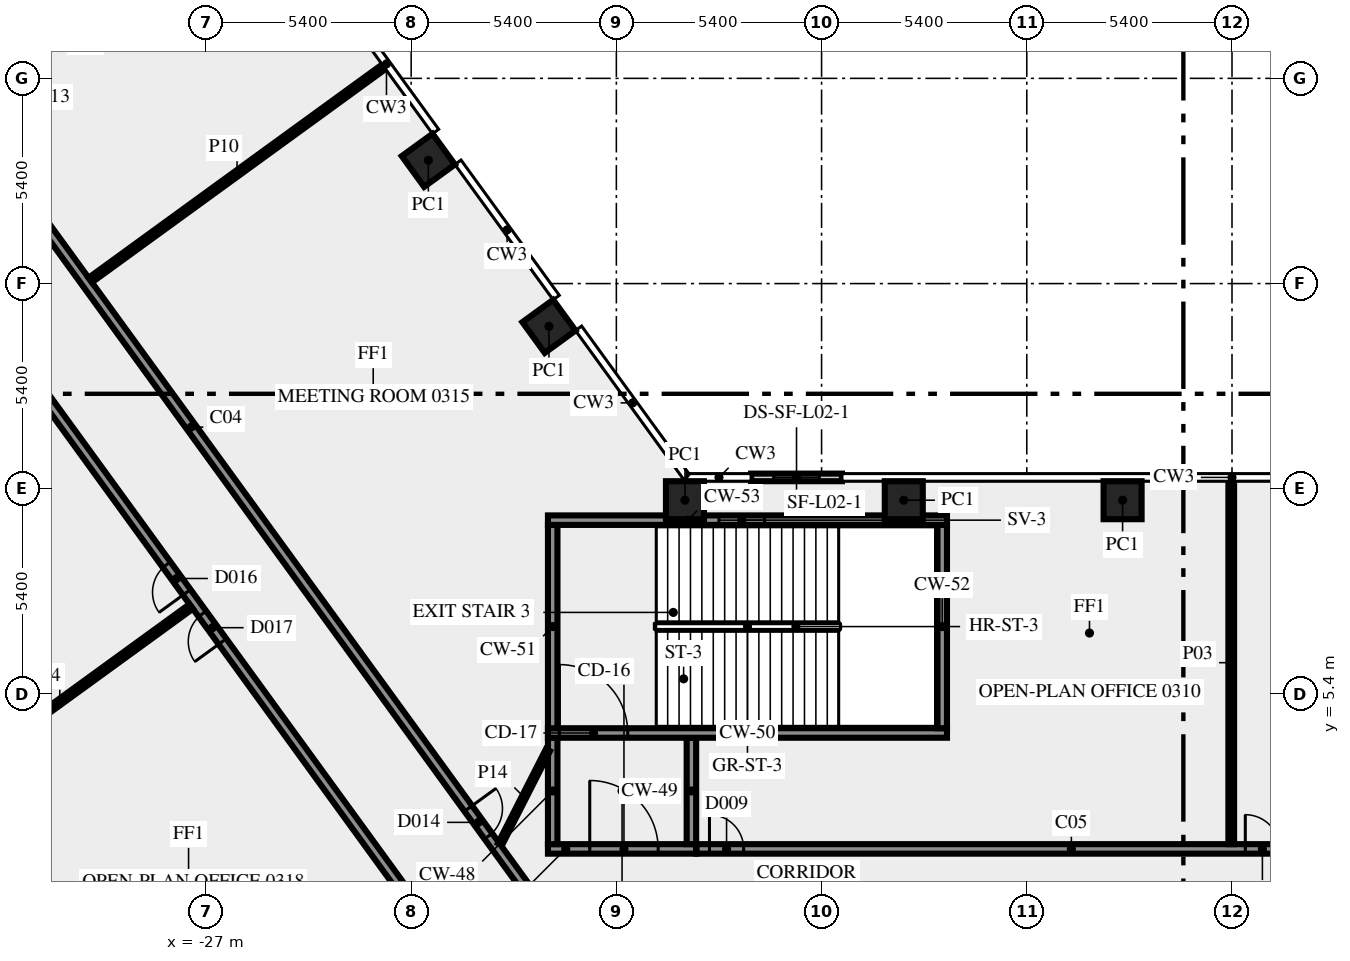
"""IFC4 building model, lengths in metres.
Left out: names, types, materials, properties, quantities, classifications, styles, units other than length and angle.
Written with IfcOpenShell. Run it as: python <this file> out.ifc"""

import sys

from ifc_helpers import new_model, si_unit, direction, frame, frame_2d, origin, origin_2d, place, context, subcontext, project, spatial, rectangle, extrude, element, fill, save


model = new_model("IFC4")
c1 = context("Model", 3, precision=1e-05, world=origin(), true_north=direction((0.0, 1.0)))
c2 = subcontext(c1, "Body", "Model", "MODEL_VIEW")
j1 = project(units=[si_unit("LENGTHUNIT", "METRE"), si_unit("PLANEANGLEUNIT", "RADIAN")], contexts=[c1])
p1 = place(None, origin())
s1 = spatial("IfcSite", under=j1, at=p1, CompositionType="ELEMENT")
p2 = place(p1, origin())
s2 = spatial("IfcBuilding", under=s1, at=p2, CompositionType="ELEMENT")
p3 = place(p2, frame((0.0, 0.0, 16.0)))
s3 = spatial("IfcBuildingStorey", under=s2, at=p3, CompositionType="ELEMENT", Elevation=16.0)
for number, where, z_axis, x_axis in (
    (1, (-17.974, 15.075, 0.0), (0.0, 0.0, 1.0), (-0.588, 0.809, 0.0)),
    (2, (-21.147, 19.444, 0.0), (0.0, 0.0, 1.0), (-0.588, 0.809, 0.0)),
    (3, (-2.879, 10.5, 0.0), (0.0, 0.0, 1.0), (-1.0, 0.0, 0.0)),
    (4, (-8.637, 10.5, 0.0), (0.0, 0.0, 1.0), (-1.0, 0.0, 0.0)),
    (5, (-14.395, 10.5, 0.0), (0.0, 0.0, 1.0), (-1.0, 0.0, 0.0)),
):
    element("IfcColumn", number, at=place(p3, frame(where, z_axis=z_axis, x_axis=x_axis)), inside=s3, PredefinedType="COLUMN", context=c2, shape_type="SweptSolid", body=[
        extrude(rectangle(XDim=1.0, YDim=1.0, at=origin_2d()), origin(), (0.0, 0.0, 1.0), 4.1),
    ])
p4 = place(p3, frame((-10.263, 11.1, 0.0), z_axis=(0.0, 0.0, 1.0), x_axis=(-1.0, 0.0, 0.0)))
e6 = element("IfcWall", 6, at=p4, inside=s3, PredefinedType="SOLIDWALL", context=c2, shape_type="SweptSolid", body=[
    extrude(rectangle(XDim=2.392, YDim=0.2, at=frame_2d((1.196, 0.0))), origin(), (0.0, 0.0, 1.0), 4.1),
])
p5 = place(p4, frame((0.596, 0.0, 1.0)))
e7 = element("IfcOpeningElement", 7, at=p5, cuts=e6, PredefinedType="OPENING", context=c2, shape_type="SweptSolid", body=[
    extrude(rectangle(XDim=1.2, YDim=1.2, at=frame_2d((0.6, 0.6))), frame((0.0, 0.11, 0.0), z_axis=(0.0, -1.0, 0.0), x_axis=(1.0, 0.0, 0.0)), (0.0, 0.0, 1.0), 0.22),
])
p6 = place(p3, frame((-18.0, 1.325, 0.0), z_axis=(0.0, 0.0, 1.0), x_axis=(1.0, 0.0, 0.0)))
e8 = element("IfcWall", 8, at=p6, inside=s3, PredefinedType="SHEAR", context=c2, shape_type="SweptSolid", body=[
    extrude(rectangle(XDim=3.9, YDim=0.25, at=frame_2d((1.95, 0.0))), origin(), (0.0, 0.0, 1.0), 4.1),
])
p7 = place(p6, frame((1.1, 0.0, 0.0)))
e9 = element("IfcOpeningElement", 9, at=p7, cuts=e8, PredefinedType="OPENING", context=c2, shape_type="SweptSolid", body=[
    extrude(rectangle(XDim=1.8, YDim=2.1, at=frame_2d((0.9, 1.05))), frame((0.0, 0.135, 0.0), z_axis=(0.0, -1.0, 0.0), x_axis=(1.0, 0.0, 0.0)), (0.0, 0.0, 1.0), 0.27),
])
for number, where, z_axis, x_axis in (
    (10, (-17.875, 1.45, 0.0), (0.0, 0.0, 1.0), (0.0, 1.0, 0.0)),
    (11, (-14.225, 1.45, 0.0), (0.0, 0.0, 1.0), (0.0, 1.0, 0.0)),
):
    element("IfcWall", number, at=place(p3, frame(where, z_axis=z_axis, x_axis=x_axis)), inside=s3, PredefinedType="SHEAR", context=c2, shape_type="SweptSolid", body=[
        extrude(rectangle(XDim=2.8, YDim=0.25, at=frame_2d((1.4, 0.0))), origin(), (0.0, 0.0, 1.0), 4.1),
    ])
p8 = place(p3, frame((-18.0, 4.375, 0.0), z_axis=(0.0, 0.0, 1.0), x_axis=(1.0, 0.0, 0.0)))
e12 = element("IfcWall", 12, at=p8, inside=s3, PredefinedType="SHEAR", context=c2, shape_type="SweptSolid", body=[
    extrude(rectangle(XDim=10.5, YDim=0.25, at=frame_2d((5.25, 0.0))), origin(), (0.0, 0.0, 1.0), 4.1),
])
p9 = place(p8, frame((0.3, 0.0, 0.0)))
e13 = element("IfcOpeningElement", 13, at=p9, cuts=e12, PredefinedType="OPENING", context=c2, shape_type="SweptSolid", body=[
    extrude(rectangle(XDim=1.8, YDim=2.1, at=frame_2d((0.9, 1.05))), frame((0.0, 0.135, 0.0), z_axis=(0.0, -1.0, 0.0), x_axis=(1.0, 0.0, 0.0)), (0.0, 0.0, 1.0), 0.27),
])
for number, where, z_axis, x_axis in (
    (14, (-17.875, 4.5, 0.0), (0.0, 0.0, 1.0), (0.0, 1.0, 0.0)),
    (15, (-7.625, 4.5, 0.0), (0.0, 0.0, 1.0), (0.0, 1.0, 0.0)),
):
    element("IfcWall", number, at=place(p3, frame(where, z_axis=z_axis, x_axis=x_axis)), inside=s3, PredefinedType="SHEAR", context=c2, shape_type="SweptSolid", body=[
        extrude(rectangle(XDim=5.35, YDim=0.25, at=frame_2d((2.675, 0.0))), origin(), (0.0, 0.0, 1.0), 4.1),
    ])
p10 = place(p3, frame((-18.0, 9.975, 0.0), z_axis=(0.0, 0.0, 1.0), x_axis=(1.0, 0.0, 0.0)))
e16 = element("IfcWall", 16, at=p10, inside=s3, PredefinedType="SHEAR", context=c2, shape_type="SweptSolid", body=[
    extrude(rectangle(XDim=10.5, YDim=0.25, at=frame_2d((5.25, 0.0))), origin(), (0.0, 0.0, 1.0), 4.1),
])
p11 = place(p10, frame((4.5, 0.0, 1.0)))
e17 = element("IfcOpeningElement", 17, at=p11, cuts=e16, PredefinedType="OPENING", context=c2, shape_type="SweptSolid", body=[
    extrude(rectangle(XDim=1.2, YDim=1.2, at=frame_2d((0.6, 0.6))), frame((0.0, 0.135, 0.0), z_axis=(0.0, -1.0, 0.0), x_axis=(1.0, 0.0, 0.0)), (0.0, 0.0, 1.0), 0.27),
])
p12 = place(p3, frame((-20.531, -1.523, 0.0), z_axis=(0.0, 0.0, 1.0), x_axis=(-0.587784522481, 0.809017524614, 0.0)))
e18 = element("IfcWall", 18, at=p12, inside=s3, PredefinedType="SOLIDWALL", context=c2, shape_type="SweptSolid", body=[
    extrude(rectangle(XDim=49.912, YDim=0.25, at=frame_2d((24.956, 0.0))), origin(), (0.0, 0.0, 1.0), 4.1),
])
p13 = place(p12, frame((10.266, 0.0, 0.0)))
e19 = element("IfcOpeningElement", 19, at=p13, cuts=e18, PredefinedType="OPENING", context=c2, shape_type="SweptSolid", body=[
    extrude(rectangle(XDim=0.9, YDim=2.1, at=frame_2d((0.45, 1.05))), frame((0.0, 0.135, 0.0), z_axis=(0.0, -1.0, 0.0), x_axis=(1.0, 0.0, 0.0)), (0.0, 0.0, 1.0), 0.27),
])
p14 = place(p12, frame((37.193, 0.0, 0.0)))
e20 = element("IfcOpeningElement", 20, at=p14, cuts=e18, PredefinedType="OPENING", context=c2, shape_type="SweptSolid", body=[
    extrude(rectangle(XDim=1.8, YDim=2.1, at=frame_2d((0.9, 1.05))), frame((0.0, 0.135, 0.0), z_axis=(0.0, -1.0, 0.0), x_axis=(1.0, 0.0, 0.0)), (0.0, 0.0, 1.0), 0.27),
])
p15 = place(p12, frame((11.866, 0.0, 0.0)))
e21 = element("IfcOpeningElement", 21, at=p15, cuts=e18, PredefinedType="OPENING", context=c2, shape_type="SweptSolid", body=[
    extrude(rectangle(XDim=0.9, YDim=2.1, at=frame_2d((0.45, 1.05))), frame((0.0, 0.135, 0.0), z_axis=(0.0, -1.0, 0.0), x_axis=(1.0, 0.0, 0.0)), (0.0, 0.0, 1.0), 0.27),
])
p16 = place(p3, frame((-37.232, 25.972, 0.0), z_axis=(0.0, 0.0, 1.0), x_axis=(0.587786323093, -0.809016216391, 0.0)))
e22 = element("IfcWall", 22, at=p16, inside=s3, PredefinedType="SOLIDWALL", context=c2, shape_type="SweptSolid", body=[
    extrude(rectangle(XDim=33.493, YDim=0.25, at=frame_2d((16.747, 0.0))), origin(), (0.0, 0.0, 1.0), 4.1),
])
p17 = place(p16, frame((29.152, 0.0, 0.0)))
e23 = element("IfcOpeningElement", 23, at=p17, cuts=e22, PredefinedType="OPENING", context=c2, shape_type="SweptSolid", body=[
    extrude(rectangle(XDim=0.9, YDim=2.1, at=frame_2d((0.45, 1.05))), frame((0.0, 0.135, 0.0), z_axis=(0.0, -1.0, 0.0), x_axis=(1.0, 0.0, 0.0)), (0.0, 0.0, 1.0), 0.27),
])
p18 = place(p16, frame((5.113, 0.0, 0.0)))
e24 = element("IfcOpeningElement", 24, at=p18, cuts=e22, PredefinedType="OPENING", context=c2, shape_type="SweptSolid", body=[
    extrude(rectangle(XDim=1.8, YDim=2.1, at=frame_2d((0.9, 1.05))), frame((0.0, 0.135, 0.0), z_axis=(0.0, -1.0, 0.0), x_axis=(1.0, 0.0, 0.0)), (0.0, 0.0, 1.0), 0.27),
])
p19 = place(p3, frame((-14.09, 1.325, 0.0), z_axis=(0.0, 0.0, 1.0), x_axis=(1.0, 0.0, 0.0)))
e25 = element("IfcWall", 25, at=p19, inside=s3, PredefinedType="SOLIDWALL", context=c2, shape_type="SweptSolid", body=[
    extrude(rectangle(XDim=28.18, YDim=0.25, at=frame_2d((14.09, 0.0))), origin(), (0.0, 0.0, 1.0), 4.1),
])
p20 = place(p19, frame((0.34, 0.0, 0.0)))
e26 = element("IfcOpeningElement", 26, at=p20, cuts=e25, PredefinedType="OPENING", context=c2, shape_type="SweptSolid", body=[
    extrude(rectangle(XDim=0.9, YDim=2.1, at=frame_2d((0.45, 1.05))), frame((0.0, 0.135, 0.0), z_axis=(0.0, -1.0, 0.0), x_axis=(1.0, 0.0, 0.0)), (0.0, 0.0, 1.0), 0.27),
])
p21 = place(p19, frame((14.44, 0.0, 0.0)))
e27 = element("IfcOpeningElement", 27, at=p21, cuts=e25, PredefinedType="OPENING", context=c2, shape_type="SweptSolid", body=[
    extrude(rectangle(XDim=0.9, YDim=2.1, at=frame_2d((0.45, 1.05))), frame((0.0, 0.135, 0.0), z_axis=(0.0, -1.0, 0.0), x_axis=(1.0, 0.0, 0.0)), (0.0, 0.0, 1.0), 0.27),
])
p22 = place(p19, frame((21.638, 0.0, 0.0)))
e28 = element("IfcOpeningElement", 28, at=p22, cuts=e25, PredefinedType="OPENING", context=c2, shape_type="SweptSolid", body=[
    extrude(rectangle(XDim=0.9, YDim=2.1, at=frame_2d((0.45, 1.05))), frame((0.0, 0.135, 0.0), z_axis=(0.0, -1.0, 0.0), x_axis=(1.0, 0.0, 0.0)), (0.0, 0.0, 1.0), 0.27),
])
p23 = place(p3, frame((-0.02, 1.45, 0.0), z_axis=(0.0, 0.0, 1.0), x_axis=(0.0, 1.0, 0.0)))
e29 = element("IfcWall", 29, at=p23, inside=s3, PredefinedType="PARTITIONING", context=c2, shape_type="SweptSolid", body=[
    extrude(rectangle(XDim=9.55, YDim=0.15, at=frame_2d((4.775, 0.0))), origin(), (0.0, 0.0, 1.0), 3.1),
])
p24 = place(p3, frame((-27.389, 7.703, 0.0), z_axis=(0.0, 0.0, 1.0), x_axis=(-0.809054740315, -0.587733295955, 0.0)))
e30 = element("IfcWall", 30, at=p24, inside=s3, PredefinedType="PARTITIONING", context=c2, shape_type="SweptSolid", body=[
    extrude(rectangle(XDim=8.545, YDim=0.15, at=frame_2d((4.272, 0.0))), origin(), (0.0, 0.0, 1.0), 4.1),
])
p25 = place(p3, frame((-22.318, 21.906, 0.0), z_axis=(0.0, 0.0, 1.0), x_axis=(-0.80898585166, -0.587828114175, 0.0)))
e31 = element("IfcWall", 31, at=p25, inside=s3, PredefinedType="PARTITIONING", context=c2, shape_type="SweptSolid", body=[
    extrude(rectangle(XDim=9.55, YDim=0.15, at=frame_2d((4.775, 0.0))), origin(), (0.0, 0.0, 1.0), 3.1),
])
p26 = place(p3, frame((-19.261, 1.45, 0.0), z_axis=(0.0, 0.0, 1.0), x_axis=(0.453950796792, 0.891026752736, 0.0)))
e32 = element("IfcWall", 32, at=p26, inside=s3, PredefinedType="PARTITIONING", context=c2, shape_type="SweptSolid", body=[
    extrude(rectangle(XDim=2.778, YDim=0.12, at=frame_2d((1.389, 0.0))), origin(), (0.0, 0.0, 1.0), 4.1),
])
p27 = place(p5, origin())
e33 = element("IfcWindow", 33, at=p27, inside=s3, PartitioningType="SINGLE_PANEL", PredefinedType="WINDOW", context=c2, shape_type="SweptSolid", body=[
    extrude(rectangle(XDim=1.2, YDim=1.2, at=frame_2d((0.6, 0.6))), frame((0.0, 0.03, 0.0), z_axis=(0.0, -1.0, 0.0), x_axis=(1.0, 0.0, 0.0)), (0.0, 0.0, 1.0), 0.06),
])
fill(e7, e33)
p28 = place(p7, origin())
e34 = element("IfcDoor", 34, at=p28, inside=s3, OperationType="DOUBLE_DOOR_SINGLE_SWING", PredefinedType="DOOR", context=c2, shape_type="SweptSolid", body=[
    extrude(rectangle(XDim=1.8, YDim=2.1, at=frame_2d((0.9, 1.05))), frame((0.0, 0.025, 0.0), z_axis=(0.0, -1.0, 0.0), x_axis=(1.0, 0.0, 0.0)), (0.0, 0.0, 1.0), 0.05),
])
fill(e9, e34)
p29 = place(p9, origin())
e35 = element("IfcDoor", 35, at=p29, inside=s3, OperationType="DOUBLE_DOOR_SINGLE_SWING", PredefinedType="DOOR", context=c2, shape_type="SweptSolid", body=[
    extrude(rectangle(XDim=1.8, YDim=2.1, at=frame_2d((0.9, 1.05))), frame((0.0, 0.025, 0.0), z_axis=(0.0, -1.0, 0.0), x_axis=(1.0, 0.0, 0.0)), (0.0, 0.0, 1.0), 0.05),
])
fill(e13, e35)
p30 = place(p11, origin())
e36 = element("IfcWindow", 36, at=p30, inside=s3, PartitioningType="SINGLE_PANEL", PredefinedType="WINDOW", context=c2, shape_type="SweptSolid", body=[
    extrude(rectangle(XDim=1.2, YDim=1.2, at=frame_2d((0.6, 0.6))), frame((0.0, 0.03, 0.0), z_axis=(0.0, -1.0, 0.0), x_axis=(1.0, 0.0, 0.0)), (0.0, 0.0, 1.0), 0.06),
])
fill(e17, e36)
p31 = place(p20, origin())
e37 = element("IfcDoor", 37, at=p31, inside=s3, OperationType="SINGLE_SWING_LEFT", PredefinedType="DOOR", context=c2, shape_type="SweptSolid", body=[
    extrude(rectangle(XDim=0.9, YDim=2.1, at=frame_2d((0.45, 1.05))), frame((0.0, 0.025, 0.0), z_axis=(0.0, -1.0, 0.0), x_axis=(1.0, 0.0, 0.0)), (0.0, 0.0, 1.0), 0.05),
])
fill(e26, e37)
p32 = place(p13, origin())
e38 = element("IfcDoor", 38, at=p32, inside=s3, OperationType="SINGLE_SWING_RIGHT", PredefinedType="DOOR", context=c2, shape_type="SweptSolid", body=[
    extrude(rectangle(XDim=0.9, YDim=2.1, at=frame_2d((0.45, 1.05))), frame((0.0, 0.025, 0.0), z_axis=(0.0, -1.0, 0.0), x_axis=(1.0, 0.0, 0.0)), (0.0, 0.0, 1.0), 0.05),
])
fill(e19, e38)
p33 = place(p21, origin())
e39 = element("IfcDoor", 39, at=p33, inside=s3, OperationType="SINGLE_SWING_LEFT", PredefinedType="DOOR", context=c2, shape_type="SweptSolid", body=[
    extrude(rectangle(XDim=0.9, YDim=2.1, at=frame_2d((0.45, 1.05))), frame((0.0, 0.025, 0.0), z_axis=(0.0, -1.0, 0.0), x_axis=(1.0, 0.0, 0.0)), (0.0, 0.0, 1.0), 0.05),
])
fill(e27, e39)
p34 = place(p17, origin())
e40 = element("IfcDoor", 40, at=p34, inside=s3, OperationType="SINGLE_SWING_RIGHT", PredefinedType="DOOR", context=c2, shape_type="SweptSolid", body=[
    extrude(rectangle(XDim=0.9, YDim=2.1, at=frame_2d((0.45, 1.05))), frame((0.0, 0.025, 0.0), z_axis=(0.0, -1.0, 0.0), x_axis=(1.0, 0.0, 0.0)), (0.0, 0.0, 1.0), 0.05),
])
fill(e23, e40)
p35 = place(p15, origin())
e41 = element("IfcDoor", 41, at=p35, inside=s3, OperationType="SINGLE_SWING_LEFT", PredefinedType="DOOR", context=c2, shape_type="SweptSolid", body=[
    extrude(rectangle(XDim=0.9, YDim=2.1, at=frame_2d((0.45, 1.05))), frame((0.0, 0.025, 0.0), z_axis=(0.0, -1.0, 0.0), x_axis=(1.0, 0.0, 0.0)), (0.0, 0.0, 1.0), 0.05),
])
fill(e21, e41)
save(model, sys.argv[1])
